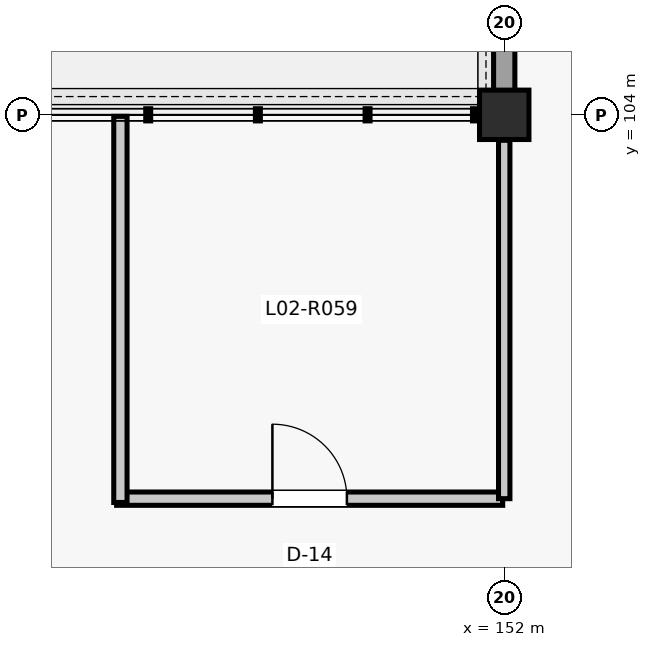
"""IFC4 building model, lengths in metres.
Left out: names, types, materials, properties, quantities, classifications, styles, units other than length and angle.
Written with IfcOpenShell. Run it as: python <this file> out.ifc"""

import sys

from ifc_helpers import new_model, si_unit, direction, frame, frame_2d, origin, origin_2d, place, context, subcontext, project, spatial, rectangle, extrude, element, fill, save


model = new_model("IFC4")
c1 = context("Model", 3, precision=1e-05, world=origin(), true_north=direction((0.0, 1.0)))
c2 = subcontext(c1, "Body", "Model", "MODEL_VIEW")
j1 = project(units=[si_unit("LENGTHUNIT", "METRE"), si_unit("PLANEANGLEUNIT", "RADIAN")], contexts=[c1])
p1 = place(None, origin())
s1 = spatial("IfcSite", under=j1, at=p1, CompositionType="ELEMENT")
p2 = place(p1, origin())
s2 = spatial("IfcBuilding", under=s1, at=p2, CompositionType="ELEMENT")
p3 = place(p2, frame((0.0, 0.0, 9.9)))
s3 = spatial("IfcBuildingStorey", under=s2, at=p3, CompositionType="ELEMENT", Elevation=9.9)
p4 = place(p3, frame((152.0, 104.0, 0.0), z_axis=(0.0, 0.0, 1.0), x_axis=(1.0, 0.0, 0.0)))
e1 = element("IfcColumn", 1, at=p4, inside=s3, PredefinedType="COLUMN", context=c2, shape_type="SweptSolid", body=[
    extrude(rectangle(XDim=0.65, YDim=0.65, at=origin_2d()), origin(), (0.0, 0.0, 1.0), 3.96),
])
p5 = place(p3, frame((152.0, 104.31, 0.0), z_axis=(0.0, 0.0, 1.0), x_axis=(0.0, 1.0, 0.0)))
e2 = element("IfcWall", 2, at=p5, inside=s3, PredefinedType="SOLIDWALL", context=c2, shape_type="SweptSolid", body=[
    extrude(rectangle(XDim=7.38, YDim=0.28, at=frame_2d((3.69, 0.0))), origin(), (0.0, 0.0, 1.0), 3.284),
])
p6 = place(p5, frame((0.753, 0.0, 0.95)))
e3 = element("IfcOpeningElement", 3, at=p6, cuts=e2, PredefinedType="OPENING", context=c2, shape_type="SweptSolid", body=[
    extrude(rectangle(XDim=1.15, YDim=1.65, at=frame_2d((0.575, 0.825))), frame((0.0, 0.15, 0.0), z_axis=(0.0, -1.0, 0.0), x_axis=(1.0, 0.0, 0.0)), (0.0, 0.0, 1.0), 0.3),
])
p7 = place(p5, frame((5.477, 0.0, 0.95)))
e4 = element("IfcOpeningElement", 4, at=p7, cuts=e2, PredefinedType="OPENING", context=c2, shape_type="SweptSolid", body=[
    extrude(rectangle(XDim=1.15, YDim=1.65, at=frame_2d((0.575, 0.825))), frame((0.0, 0.15, 0.0), z_axis=(0.0, -1.0, 0.0), x_axis=(1.0, 0.0, 0.0)), (0.0, 0.0, 1.0), 0.3),
])
p8 = place(p3, frame((146.9, 98.95, 0.0), z_axis=(0.0, 0.0, 1.0), x_axis=(1.0, 0.0, 0.0)))
e5 = element("IfcWall", 5, at=p8, inside=s3, PredefinedType="PARTITIONING", context=c2, shape_type="SweptSolid", body=[
    extrude(rectangle(XDim=5.08, YDim=0.175, at=frame_2d((2.54, 0.0))), origin(), (0.0, 0.0, 1.0), 3.221),
])
p9 = place(p8, frame((2.05, 0.0, 0.0)))
e6 = element("IfcOpeningElement", 6, at=p9, cuts=e5, PredefinedType="OPENING", context=c2, shape_type="SweptSolid", body=[
    extrude(rectangle(XDim=0.98, YDim=2.15, at=frame_2d((0.49, 1.075))), frame((0.0, 0.097, 0.0), z_axis=(0.0, -1.0, 0.0), x_axis=(1.0, 0.0, 0.0)), (0.0, 0.0, 1.0), 0.195),
])
p10 = place(p3, frame((146.95, 98.9, 0.0), z_axis=(0.0, 0.0, 1.0), x_axis=(0.0, 1.0, 0.0)))
e7 = element("IfcWall", 7, at=p10, inside=s3, PredefinedType="PARTITIONING", context=c2, shape_type="SweptSolid", body=[
    extrude(rectangle(XDim=5.08, YDim=0.175, at=frame_2d((2.54, 0.0))), origin(), (0.0, 0.0, 1.0), 3.337),
])
p11 = place(p3, frame((152.0, 98.95, 0.0), z_axis=(0.0, 0.0, 1.0), x_axis=(0.0, 1.0, 0.0)))
e8 = element("IfcWall", 8, at=p11, inside=s3, PredefinedType="PARTITIONING", context=c2, shape_type="SweptSolid", body=[
    extrude(rectangle(XDim=4.715, YDim=0.15, at=frame_2d((2.357, 0.0))), origin(), (0.0, 0.0, 1.0), 3.221),
])
p12 = place(p9, origin())
e9 = element("IfcDoor", 9, at=p12, inside=s3, OperationType="SINGLE_SWING_LEFT", PredefinedType="DOOR", context=c2, shape_type="SweptSolid", body=[
    extrude(rectangle(XDim=0.98, YDim=2.15, at=frame_2d((0.49, 1.075))), frame((0.0, 0.025, 0.0), z_axis=(0.0, -1.0, 0.0), x_axis=(1.0, 0.0, 0.0)), (0.0, 0.0, 1.0), 0.05),
])
fill(e6, e9)
save(model, sys.argv[1])
